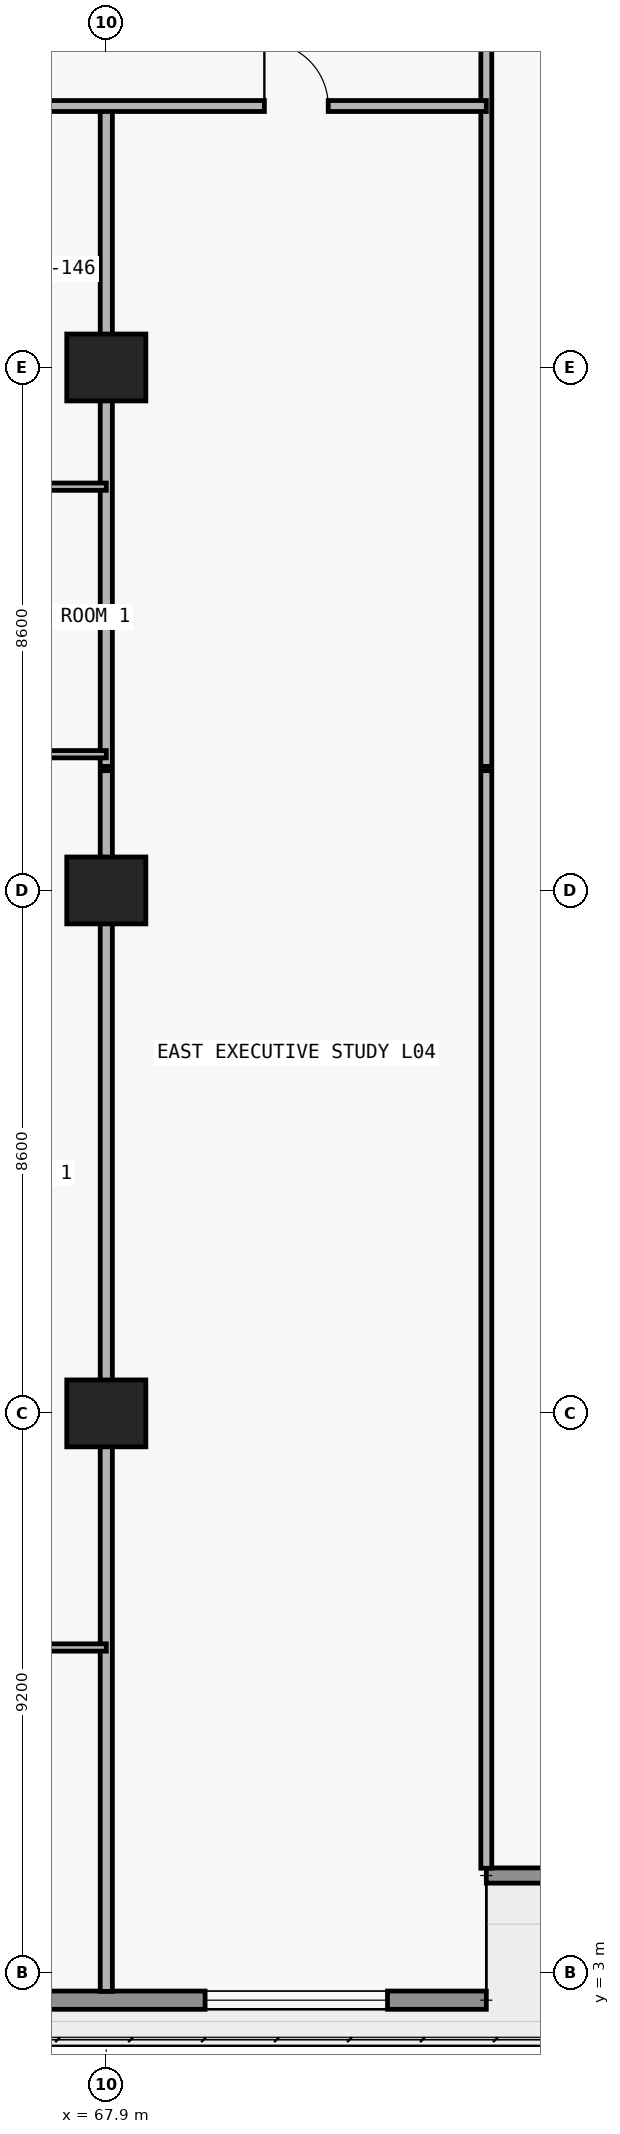
"""IFC4 building model, lengths in metres.
Left out: names, types, materials, properties, quantities, classifications, styles, units other than length and angle.
Written with IfcOpenShell. Run it as: python <this file> out.ifc"""

import sys

from ifc_helpers import new_model, si_unit, direction, frame, frame_2d, origin, origin_2d, place, context, subcontext, project, spatial, rectangle, extrude, element, fill, save


model = new_model("IFC4")
c1 = context("Model", 3, precision=1e-05, world=origin(), true_north=direction((0.0, 1.0)))
c2 = subcontext(c1, "Body", "Model", "MODEL_VIEW")
j1 = project(units=[si_unit("LENGTHUNIT", "METRE"), si_unit("PLANEANGLEUNIT", "RADIAN")], contexts=[c1])
p1 = place(None, origin())
s1 = spatial("IfcSite", under=j1, at=p1, CompositionType="ELEMENT")
p2 = place(p1, origin())
s2 = spatial("IfcBuilding", under=s1, at=p2, CompositionType="ELEMENT")
p3 = place(p2, frame((0.0, 0.0, 19.8)))
s3 = spatial("IfcBuildingStorey", under=s2, at=p3, CompositionType="ELEMENT", Elevation=19.8)
for number, where, z_axis, x_axis in (
    (1, (67.9, 12.2, 0.0), (0.0, 0.0, 1.0), (1.0, 0.0, 0.0)),
    (2, (67.9, 20.8, 0.0), (0.0, 0.0, 1.0), (1.0, 0.0, 0.0)),
    (3, (67.9, 29.4, 0.0), (0.0, 0.0, 1.0), (1.0, 0.0, 0.0)),
):
    element("IfcColumn", number, at=place(p3, frame(where, z_axis=z_axis, x_axis=x_axis)), inside=s3, PredefinedType="COLUMN", context=c2, shape_type="SweptSolid", body=[
        extrude(rectangle(XDim=1.3, YDim=1.1, at=origin_2d()), origin(), (0.0, 0.0, 1.0), 4.45),
    ])
p4 = place(p3, frame((74.15, 2.55, 0.0), z_axis=(0.0, 0.0, 1.0), x_axis=(-1.0, 0.0, 0.0)))
e4 = element("IfcWall", 4, at=p4, inside=s3, PredefinedType="STANDARD", context=c2, shape_type="SweptSolid", body=[
    extrude(rectangle(XDim=70.5, YDim=0.3, at=frame_2d((35.25, 0.0))), origin(), (0.0, 0.0, 1.0), 4.45),
])
p5 = place(p4, frame((65.875, 0.0, 0.85)))
e5 = element("IfcOpeningElement", 5, at=p5, cuts=e4, PredefinedType="OPENING", context=c2, shape_type="SweptSolid", body=[
    extrude(rectangle(XDim=3.0, YDim=2.4, at=frame_2d((1.5, 1.2))), frame((0.0, 0.16, 0.0), z_axis=(0.0, -1.0, 0.0), x_axis=(1.0, 0.0, 0.0)), (0.0, 0.0, 1.0), 0.32),
])
p6 = place(p4, frame((61.376, 0.0, 0.0)))
e6 = element("IfcOpeningElement", 6, at=p6, cuts=e4, PredefinedType="OPENING", context=c2, shape_type="SweptSolid", body=[
    extrude(rectangle(XDim=1.8, YDim=2.3, at=frame_2d((0.9, 1.15))), frame((0.0, 0.16, 0.0), z_axis=(0.0, -1.0, 0.0), x_axis=(1.0, 0.0, 0.0)), (0.0, 0.0, 1.0), 0.32),
])
p7 = place(p4, frame((56.976, 0.0, 0.85)))
e7 = element("IfcOpeningElement", 7, at=p7, cuts=e4, PredefinedType="OPENING", context=c2, shape_type="SweptSolid", body=[
    extrude(rectangle(XDim=2.2, YDim=1.55, at=frame_2d((1.1, 0.775))), frame((0.0, 0.16, 0.0), z_axis=(0.0, -1.0, 0.0), x_axis=(1.0, 0.0, 0.0)), (0.0, 0.0, 1.0), 0.32),
])
p8 = place(p4, frame((52.64, 0.0, 0.0)))
e8 = element("IfcOpeningElement", 8, at=p8, cuts=e4, PredefinedType="OPENING", context=c2, shape_type="SweptSolid", body=[
    extrude(rectangle(XDim=1.8, YDim=2.3, at=frame_2d((0.9, 1.15))), frame((0.0, 0.16, 0.0), z_axis=(0.0, -1.0, 0.0), x_axis=(1.0, 0.0, 0.0)), (0.0, 0.0, 1.0), 0.32),
])
p9 = place(p4, frame((48.24, 0.0, 0.85)))
e9 = element("IfcOpeningElement", 9, at=p9, cuts=e4, PredefinedType="OPENING", context=c2, shape_type="SweptSolid", body=[
    extrude(rectangle(XDim=2.2, YDim=1.55, at=frame_2d((1.1, 0.775))), frame((0.0, 0.16, 0.0), z_axis=(0.0, -1.0, 0.0), x_axis=(1.0, 0.0, 0.0)), (0.0, 0.0, 1.0), 0.32),
])
p10 = place(p4, frame((34.35, 0.0, 0.0)))
e10 = element("IfcOpeningElement", 10, at=p10, cuts=e4, PredefinedType="OPENING", context=c2, shape_type="SweptSolid", body=[
    extrude(rectangle(XDim=1.8, YDim=2.3, at=frame_2d((0.9, 1.15))), frame((0.0, 0.16, 0.0), z_axis=(0.0, -1.0, 0.0), x_axis=(1.0, 0.0, 0.0)), (0.0, 0.0, 1.0), 0.32),
])
p11 = place(p4, frame((17.95, 0.0, 0.0)))
e11 = element("IfcOpeningElement", 11, at=p11, cuts=e4, PredefinedType="OPENING", context=c2, shape_type="SweptSolid", body=[
    extrude(rectangle(XDim=1.8, YDim=2.3, at=frame_2d((0.9, 1.15))), frame((0.0, 0.16, 0.0), z_axis=(0.0, -1.0, 0.0), x_axis=(1.0, 0.0, 0.0)), (0.0, 0.0, 1.0), 0.32),
])
p12 = place(p4, frame((9.35, 0.0, 0.85)))
e12 = element("IfcOpeningElement", 12, at=p12, cuts=e4, PredefinedType="OPENING", context=c2, shape_type="SweptSolid", body=[
    extrude(rectangle(XDim=2.2, YDim=1.55, at=frame_2d((1.1, 0.775))), frame((0.0, 0.16, 0.0), z_axis=(0.0, -1.0, 0.0), x_axis=(1.0, 0.0, 0.0)), (0.0, 0.0, 1.0), 0.32),
])
p13 = place(p4, frame((1.625, 0.0, 0.85)))
e13 = element("IfcOpeningElement", 13, at=p13, cuts=e4, PredefinedType="OPENING", context=c2, shape_type="SweptSolid", body=[
    extrude(rectangle(XDim=3.0, YDim=2.4, at=frame_2d((1.5, 1.2))), frame((0.0, 0.16, 0.0), z_axis=(0.0, -1.0, 0.0), x_axis=(1.0, 0.0, 0.0)), (0.0, 0.0, 1.0), 0.32),
])
p14 = place(p3, frame((74.15, 4.6, 0.0), z_axis=(0.0, 0.0, 1.0), x_axis=(1.0, 0.0, 0.0)))
e14 = element("IfcWall", 14, at=p14, inside=s3, PredefinedType="ELEMENTEDWALL", context=c2, shape_type="SweptSolid", body=[
    extrude(rectangle(XDim=2.25, YDim=0.25, at=frame_2d((1.125, 0.0))), origin(), (0.0, 0.0, 1.0), 4.45),
])
p15 = place(p3, frame((67.9, 2.695, 0.0), z_axis=(0.0, 0.0, 1.0), x_axis=(0.0, 1.0, 0.0)))
e15 = element("IfcWall", 15, at=p15, inside=s3, PredefinedType="PARTITIONING", context=c2, shape_type="SweptSolid", body=[
    extrude(rectangle(XDim=20.075, YDim=0.2, at=frame_2d((10.038, 0.0))), origin(), (0.0, 0.0, 1.0), 3.414),
])
p16 = place(p3, frame((67.9, 22.84, 0.0), z_axis=(0.0, 0.0, 1.0), x_axis=(0.0, 1.0, 0.0)))
e16 = element("IfcWall", 16, at=p16, inside=s3, PredefinedType="PARTITIONING", context=c2, shape_type="SweptSolid", body=[
    extrude(rectangle(XDim=10.86, YDim=0.2, at=frame_2d((5.43, 0.0))), origin(), (0.0, 0.0, 1.0), 3.414),
])
p17 = place(p3, frame((74.15, 4.72, 0.0), z_axis=(0.0, 0.0, 1.0), x_axis=(0.0, 1.0, 0.0)))
e17 = element("IfcWall", 17, at=p17, inside=s3, PredefinedType="PARTITIONING", context=c2, shape_type="SweptSolid", body=[
    extrude(rectangle(XDim=18.05, YDim=0.18, at=frame_2d((9.025, 0.0))), origin(), (0.0, 0.0, 1.0), 4.45),
])
p18 = place(p3, frame((74.15, 22.84, 0.0), z_axis=(0.0, 0.0, 1.0), x_axis=(0.0, 1.0, 0.0)))
e18 = element("IfcWall", 18, at=p18, inside=s3, PredefinedType="PARTITIONING", context=c2, shape_type="SweptSolid", body=[
    extrude(rectangle(XDim=25.44, YDim=0.18, at=frame_2d((12.72, 0.0))), origin(), (0.0, 0.0, 1.0), 4.45),
])
p19 = place(p3, frame((59.5, 8.35, 0.0), z_axis=(0.0, 0.0, 1.0), x_axis=(1.0, 0.0, 0.0)))
e19 = element("IfcWall", 19, at=p19, inside=s3, PredefinedType="PARTITIONING", context=c2, shape_type="SweptSolid", body=[
    extrude(rectangle(XDim=8.4, YDim=0.12, at=frame_2d((4.2, 0.0))), origin(), (0.0, 0.0, 1.0), 4.45),
])
p20 = place(p19, frame((3.75, 0.0, 0.0)))
e20 = element("IfcOpeningElement", 20, at=p20, cuts=e19, PredefinedType="OPENING", context=c2, shape_type="SweptSolid", body=[
    extrude(rectangle(XDim=0.9, YDim=2.15, at=frame_2d((0.45, 1.075))), frame((0.0, 0.07, 0.0), z_axis=(0.0, -1.0, 0.0), x_axis=(1.0, 0.0, 0.0)), (0.0, 0.0, 1.0), 0.14),
])
p21 = place(p3, frame((59.505, 23.04, 0.0), z_axis=(0.0, 0.0, 1.0), x_axis=(1.0, 0.0, 0.0)))
e21 = element("IfcWall", 21, at=p21, inside=s3, PredefinedType="PARTITIONING", context=c2, shape_type="SweptSolid", body=[
    extrude(rectangle(XDim=8.395, YDim=0.12, at=frame_2d((4.198, 0.0))), origin(), (0.0, 0.0, 1.0), 4.45),
])
p22 = place(p21, frame((3.748, 0.0, 0.0)))
e22 = element("IfcOpeningElement", 22, at=p22, cuts=e21, PredefinedType="OPENING", context=c2, shape_type="SweptSolid", body=[
    extrude(rectangle(XDim=0.9, YDim=2.15, at=frame_2d((0.45, 1.075))), frame((0.0, 0.07, 0.0), z_axis=(0.0, -1.0, 0.0), x_axis=(1.0, 0.0, 0.0)), (0.0, 0.0, 1.0), 0.14),
])
p23 = place(p3, frame((59.5, 27.44, 0.0), z_axis=(0.0, 0.0, 1.0), x_axis=(1.0, 0.0, 0.0)))
e23 = element("IfcWall", 23, at=p23, inside=s3, PredefinedType="PARTITIONING", context=c2, shape_type="SweptSolid", body=[
    extrude(rectangle(XDim=8.4, YDim=0.12, at=frame_2d((4.2, 0.0))), origin(), (0.0, 0.0, 1.0), 4.45),
])
p24 = place(p23, frame((2.983, 0.0, 0.0)))
e24 = element("IfcOpeningElement", 24, at=p24, cuts=e23, PredefinedType="OPENING", context=c2, shape_type="SweptSolid", body=[
    extrude(rectangle(XDim=0.9, YDim=2.15, at=frame_2d((0.45, 1.075))), frame((0.0, 0.07, 0.0), z_axis=(0.0, -1.0, 0.0), x_axis=(1.0, 0.0, 0.0)), (0.0, 0.0, 1.0), 0.14),
])
p25 = place(p3, frame((26.7, 33.7, 0.0), z_axis=(0.0, 0.0, 1.0), x_axis=(1.0, 0.0, 0.0)))
e25 = element("IfcWall", 25, at=p25, inside=s3, PredefinedType="PARTITIONING", context=c2, shape_type="SweptSolid", body=[
    extrude(rectangle(XDim=47.45, YDim=0.18, at=frame_2d((23.725, 0.0))), origin(), (0.0, 0.0, 1.0), 4.45),
])
p26 = place(p25, frame((11.675, 0.0, 0.0)))
e26 = element("IfcOpeningElement", 26, at=p26, cuts=e25, PredefinedType="OPENING", context=c2, shape_type="SweptSolid", body=[
    extrude(rectangle(XDim=1.05, YDim=2.15, at=frame_2d((0.525, 1.075))), frame((0.0, 0.1, 0.0), z_axis=(0.0, -1.0, 0.0), x_axis=(1.0, 0.0, 0.0)), (0.0, 0.0, 1.0), 0.2),
])
p27 = place(p25, frame((27.25, 0.0, 0.0)))
e27 = element("IfcOpeningElement", 27, at=p27, cuts=e25, PredefinedType="OPENING", context=c2, shape_type="SweptSolid", body=[
    extrude(rectangle(XDim=1.0, YDim=2.2, at=frame_2d((0.5, 1.1))), frame((0.0, 0.1, 0.0), z_axis=(0.0, -1.0, 0.0), x_axis=(1.0, 0.0, 0.0)), (0.0, 0.0, 1.0), 0.2),
])
p28 = place(p25, frame((43.8, 0.0, 0.0)))
e28 = element("IfcOpeningElement", 28, at=p28, cuts=e25, PredefinedType="OPENING", context=c2, shape_type="SweptSolid", body=[
    extrude(rectangle(XDim=1.05, YDim=2.15, at=frame_2d((0.525, 1.075))), frame((0.0, 0.1, 0.0), z_axis=(0.0, -1.0, 0.0), x_axis=(1.0, 0.0, 0.0)), (0.0, 0.0, 1.0), 0.2),
])
p29 = place(p13, origin())
e29 = element("IfcWindow", 29, at=p29, inside=s3, PartitioningType="SINGLE_PANEL", PredefinedType="WINDOW", context=c2, shape_type="SweptSolid", body=[
    extrude(rectangle(XDim=3.0, YDim=2.4, at=frame_2d((1.5, 1.2))), frame((0.0, 0.03, 0.0), z_axis=(0.0, -1.0, 0.0), x_axis=(1.0, 0.0, 0.0)), (0.0, 0.0, 1.0), 0.06),
])
fill(e13, e29)
p30 = place(p28, origin())
e30 = element("IfcDoor", 30, at=p30, inside=s3, OperationType="SINGLE_SWING_LEFT", PredefinedType="DOOR", context=c2, shape_type="SweptSolid", body=[
    extrude(rectangle(XDim=1.05, YDim=2.15, at=frame_2d((0.525, 1.075))), frame((0.0, 0.025, 0.0), z_axis=(0.0, -1.0, 0.0), x_axis=(1.0, 0.0, 0.0)), (0.0, 0.0, 1.0), 0.05),
])
fill(e28, e30)
save(model, sys.argv[1])
